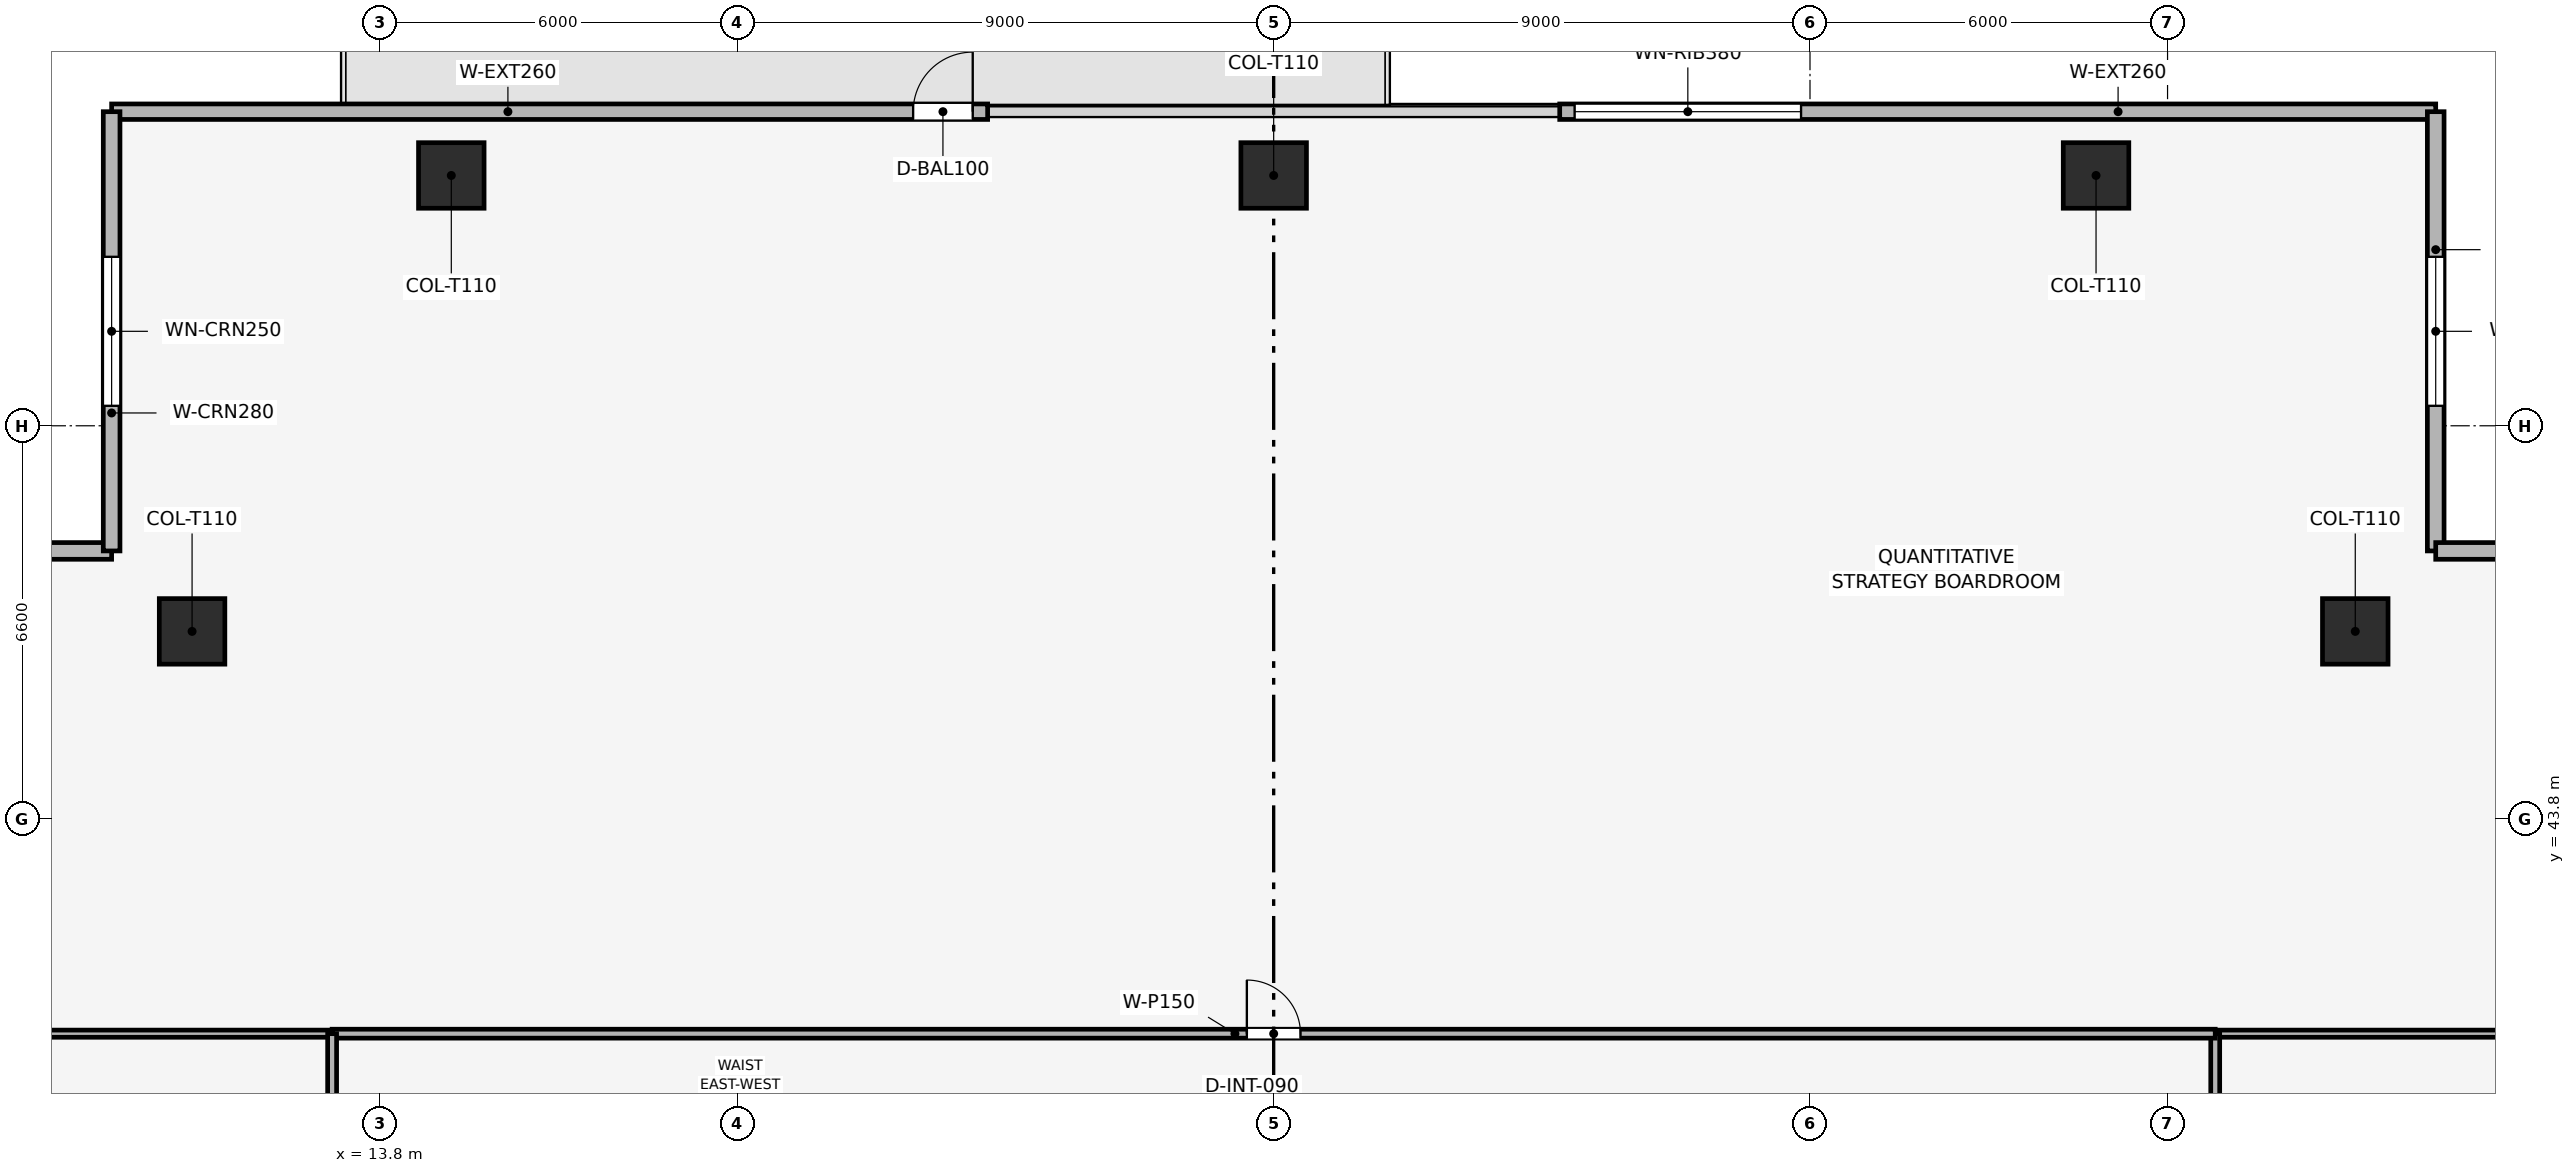
"""IFC4 building model, lengths in metres.
Left out: names, types, materials, properties, quantities, classifications, styles, units other than length and angle.
Written with IfcOpenShell. Run it as: python <this file> out.ifc"""

import sys

from ifc_helpers import new_model, si_unit, direction, frame, frame_2d, origin, origin_2d, place, context, subcontext, project, spatial, rectangle, extrude, element, fill, save


model = new_model("IFC4")
c1 = context("Model", 3, precision=1e-05, world=origin(), true_north=direction((0.0, 1.0)))
c2 = subcontext(c1, "Body", "Model", "MODEL_VIEW")
j1 = project(units=[si_unit("LENGTHUNIT", "METRE"), si_unit("PLANEANGLEUNIT", "RADIAN")], contexts=[c1])
p1 = place(None, origin())
s1 = spatial("IfcSite", under=j1, at=p1, CompositionType="ELEMENT")
p2 = place(p1, origin())
s2 = spatial("IfcBuilding", under=s1, at=p2, CompositionType="ELEMENT")
p3 = place(p2, frame((0.0, 0.0, 214.95)))
s3 = spatial("IfcBuildingStorey", under=s2, at=p3, CompositionType="ELEMENT", Elevation=214.95)
for number, where, z_axis, x_axis in (
    (1, (42.6, 54.6, 0.003), (0.0, 0.0, 1.0), (1.0, 0.0, 0.0)),
    (2, (28.8, 54.6, 0.003), (0.0, 0.0, 1.0), (1.0, 0.0, 0.0)),
    (3, (15.0, 54.6, 0.003), (0.0, 0.0, 1.0), (1.0, 0.0, 0.0)),
    (4, (46.95, 46.95, 0.003), (0.0, 0.0, 1.0), (1.0, 0.0, 0.0)),
    (5, (10.65, 46.95, 0.003), (0.0, 0.0, 1.0), (1.0, 0.0, 0.0)),
):
    element("IfcColumn", number, at=place(p3, frame(where, z_axis=z_axis, x_axis=x_axis)), inside=s3, PredefinedType="COLUMN", context=c2, shape_type="SweptSolid", body=[
        extrude(rectangle(XDim=1.1, YDim=1.1, at=origin_2d()), origin(), (0.0, 0.0, 1.0), 3.494),
    ])
p4 = place(p3, frame((9.3, 55.67, 0.0), z_axis=(0.0, 0.0, 1.0), x_axis=(1.0, 0.0, 0.0)))
e6 = element("IfcWall", 6, at=p4, inside=s3, PredefinedType="SOLIDWALL", context=c2, shape_type="SweptSolid", body=[
    extrude(rectangle(XDim=14.7, YDim=0.26, at=frame_2d((7.35, 0.0))), origin(), (0.0, 0.0, 1.0), 3.5),
])
p5 = place(p4, frame((13.45, 0.0, 0.0)))
e7 = element("IfcOpeningElement", 7, at=p5, cuts=e6, PredefinedType="OPENING", context=c2, shape_type="SweptSolid", body=[
    extrude(rectangle(XDim=1.0, YDim=2.2, at=frame_2d((0.5, 1.1))), frame((0.0, 0.14, 0.0), z_axis=(0.0, -1.0, 0.0), x_axis=(1.0, 0.0, 0.0)), (0.0, 0.0, 1.0), 0.28),
])
p6 = place(p3, frame((33.6, 55.67, 0.0), z_axis=(0.0, 0.0, 1.0), x_axis=(1.0, 0.0, 0.0)))
e8 = element("IfcWall", 8, at=p6, inside=s3, PredefinedType="SOLIDWALL", context=c2, shape_type="SweptSolid", body=[
    extrude(rectangle(XDim=14.7, YDim=0.26, at=frame_2d((7.35, 0.0))), origin(), (0.0, 0.0, 1.0), 3.5),
])
p7 = place(p6, frame((0.25, 0.0, 0.9)))
e9 = element("IfcOpeningElement", 9, at=p7, cuts=e8, PredefinedType="OPENING", context=c2, shape_type="SweptSolid", body=[
    extrude(rectangle(XDim=3.8, YDim=1.9, at=frame_2d((1.9, 0.95))), frame((0.0, 0.14, 0.0), z_axis=(0.0, -1.0, 0.0), x_axis=(1.0, 0.0, 0.0)), (0.0, 0.0, 1.0), 0.28),
])
p8 = place(p3, frame((1.93, 48.3, 0.0), z_axis=(0.0, 0.0, 1.0), x_axis=(1.0, 0.0, 0.0)))
e10 = element("IfcWall", 10, at=p8, inside=s3, PredefinedType="SOLIDWALL", context=c2, shape_type="SweptSolid", body=[
    extrude(rectangle(XDim=7.37, YDim=0.28, at=frame_2d((3.685, 0.0))), origin(), (0.0, 0.0, 1.0), 3.5),
])
p9 = place(p8, frame((2.435, 0.0, 0.9)))
e11 = element("IfcOpeningElement", 11, at=p9, cuts=e10, PredefinedType="OPENING", context=c2, shape_type="SweptSolid", body=[
    extrude(rectangle(XDim=2.5, YDim=1.9, at=frame_2d((1.25, 0.95))), frame((0.0, 0.15, 0.0), z_axis=(0.0, -1.0, 0.0), x_axis=(1.0, 0.0, 0.0)), (0.0, 0.0, 1.0), 0.3),
])
p10 = place(p3, frame((9.3, 48.3, 0.0), z_axis=(0.0, 0.0, 1.0), x_axis=(0.0, 1.0, 0.0)))
e12 = element("IfcWall", 12, at=p10, inside=s3, PredefinedType="SOLIDWALL", context=c2, shape_type="SweptSolid", body=[
    extrude(rectangle(XDim=7.37, YDim=0.28, at=frame_2d((3.685, 0.0))), origin(), (0.0, 0.0, 1.0), 3.5),
])
p11 = place(p10, frame((2.435, 0.0, 0.9)))
e13 = element("IfcOpeningElement", 13, at=p11, cuts=e12, PredefinedType="OPENING", context=c2, shape_type="SweptSolid", body=[
    extrude(rectangle(XDim=2.5, YDim=1.9, at=frame_2d((1.25, 0.95))), frame((0.0, 0.15, 0.0), z_axis=(0.0, -1.0, 0.0), x_axis=(1.0, 0.0, 0.0)), (0.0, 0.0, 1.0), 0.3),
])
p12 = place(p3, frame((48.3, 55.67, 0.0), z_axis=(0.0, 0.0, 1.0), x_axis=(0.0, -1.0, 0.0)))
e14 = element("IfcWall", 14, at=p12, inside=s3, PredefinedType="SOLIDWALL", context=c2, shape_type="SweptSolid", body=[
    extrude(rectangle(XDim=7.37, YDim=0.28, at=frame_2d((3.685, 0.0))), origin(), (0.0, 0.0, 1.0), 3.5),
])
p13 = place(p12, frame((2.435, 0.0, 0.9)))
e15 = element("IfcOpeningElement", 15, at=p13, cuts=e14, PredefinedType="OPENING", context=c2, shape_type="SweptSolid", body=[
    extrude(rectangle(XDim=2.5, YDim=1.9, at=frame_2d((1.25, 0.95))), frame((0.0, 0.15, 0.0), z_axis=(0.0, -1.0, 0.0), x_axis=(1.0, 0.0, 0.0)), (0.0, 0.0, 1.0), 0.3),
])
p14 = place(p3, frame((48.3, 48.3, 0.0), z_axis=(0.0, 0.0, 1.0), x_axis=(1.0, 0.0, 0.0)))
e16 = element("IfcWall", 16, at=p14, inside=s3, PredefinedType="SOLIDWALL", context=c2, shape_type="SweptSolid", body=[
    extrude(rectangle(XDim=7.37, YDim=0.28, at=frame_2d((3.685, 0.0))), origin(), (0.0, 0.0, 1.0), 3.5),
])
p15 = place(p14, frame((2.435, 0.0, 0.9)))
e17 = element("IfcOpeningElement", 17, at=p15, cuts=e16, PredefinedType="OPENING", context=c2, shape_type="SweptSolid", body=[
    extrude(rectangle(XDim=2.5, YDim=1.9, at=frame_2d((1.25, 0.95))), frame((0.0, 0.15, 0.0), z_axis=(0.0, -1.0, 0.0), x_axis=(1.0, 0.0, 0.0)), (0.0, 0.0, 1.0), 0.3),
])
p16 = place(p3, frame((1.93, 40.2, 0.0), z_axis=(0.0, 0.0, 1.0), x_axis=(1.0, 0.0, 0.0)))
e18 = element("IfcWall", 18, at=p16, inside=s3, PredefinedType="PARTITIONING", context=c2, shape_type="SweptSolid", body=[
    extrude(rectangle(XDim=11.07, YDim=0.12, at=frame_2d((5.535, 0.0))), origin(), (0.0, 0.0, 1.0), 2.885),
])
p17 = place(p3, frame((44.6, 40.2, 0.0), z_axis=(0.0, 0.0, 1.0), x_axis=(1.0, 0.0, 0.0)))
e19 = element("IfcWall", 19, at=p17, inside=s3, PredefinedType="PARTITIONING", context=c2, shape_type="SweptSolid", body=[
    extrude(rectangle(XDim=11.07, YDim=0.12, at=frame_2d((5.535, 0.0))), origin(), (0.0, 0.0, 1.0), 2.885),
])
p18 = place(p3, frame((44.6, 37.8, 0.0), z_axis=(0.0, 0.0, 1.0), x_axis=(0.0, 1.0, 0.0)))
e20 = element("IfcWall", 20, at=p18, inside=s3, PredefinedType="PARTITIONING", context=c2, shape_type="SweptSolid", body=[
    extrude(rectangle(XDim=2.4, YDim=0.15, at=frame_2d((1.2, 0.0))), origin(), (0.0, 0.0, 1.0), 3.5),
])
p19 = place(p3, frame((13.0, 40.2, 0.0), z_axis=(0.0, 0.0, 1.0), x_axis=(1.0, 0.0, 0.0)))
e21 = element("IfcWall", 21, at=p19, inside=s3, PredefinedType="PARTITIONING", context=c2, shape_type="SweptSolid", body=[
    extrude(rectangle(XDim=31.6, YDim=0.15, at=frame_2d((15.8, 0.0))), origin(), (0.0, 0.0, 1.0), 3.035),
])
p20 = place(p19, frame((15.35, 0.0, 0.0)))
e22 = element("IfcOpeningElement", 22, at=p20, cuts=e21, PredefinedType="OPENING", context=c2, shape_type="SweptSolid", body=[
    extrude(rectangle(XDim=0.9, YDim=2.1, at=frame_2d((0.45, 1.05))), frame((0.0, 0.085, 0.0), z_axis=(0.0, -1.0, 0.0), x_axis=(1.0, 0.0, 0.0)), (0.0, 0.0, 1.0), 0.17),
])
p21 = place(p3, frame((13.0, 17.4, 0.0), z_axis=(0.0, 0.0, 1.0), x_axis=(0.0, 1.0, 0.0)))
e23 = element("IfcWall", 23, at=p21, inside=s3, PredefinedType="PARTITIONING", context=c2, shape_type="SweptSolid", body=[
    extrude(rectangle(XDim=22.8, YDim=0.15, at=frame_2d((11.4, 0.0))), origin(), (0.0, 0.0, 1.0), 3.035),
])
p22 = place(p21, frame((3.1, 0.0, 0.0)))
e24 = element("IfcOpeningElement", 24, at=p22, cuts=e23, PredefinedType="OPENING", context=c2, shape_type="SweptSolid", body=[
    extrude(rectangle(XDim=0.9, YDim=2.1, at=frame_2d((0.45, 1.05))), frame((0.0, 0.085, 0.0), z_axis=(0.0, -1.0, 0.0), x_axis=(1.0, 0.0, 0.0)), (0.0, 0.0, 1.0), 0.17),
])
p23 = place(p21, frame((6.529, 0.0, 0.0)))
e25 = element("IfcOpeningElement", 25, at=p23, cuts=e23, PredefinedType="OPENING", context=c2, shape_type="SweptSolid", body=[
    extrude(rectangle(XDim=0.9, YDim=2.1, at=frame_2d((0.45, 1.05))), frame((0.0, 0.085, 0.0), z_axis=(0.0, -1.0, 0.0), x_axis=(1.0, 0.0, 0.0)), (0.0, 0.0, 1.0), 0.17),
])
p24 = place(p21, frame((10.957, 0.0, 0.0)))
e26 = element("IfcOpeningElement", 26, at=p24, cuts=e23, PredefinedType="OPENING", context=c2, shape_type="SweptSolid", body=[
    extrude(rectangle(XDim=0.9, YDim=2.1, at=frame_2d((0.45, 1.05))), frame((0.0, 0.085, 0.0), z_axis=(0.0, -1.0, 0.0), x_axis=(1.0, 0.0, 0.0)), (0.0, 0.0, 1.0), 0.17),
])
p25 = place(p21, frame((16.527, 0.0, 0.0)))
e27 = element("IfcOpeningElement", 27, at=p25, cuts=e23, PredefinedType="OPENING", context=c2, shape_type="SweptSolid", body=[
    extrude(rectangle(XDim=0.9, YDim=2.1, at=frame_2d((0.45, 1.05))), frame((0.0, 0.085, 0.0), z_axis=(0.0, -1.0, 0.0), x_axis=(1.0, 0.0, 0.0)), (0.0, 0.0, 1.0), 0.17),
])
p26 = place(p5, origin())
e28 = element("IfcDoor", 28, at=p26, inside=s3, OperationType="SINGLE_SWING_RIGHT", PredefinedType="DOOR", context=c2, shape_type="SweptSolid", body=[
    extrude(rectangle(XDim=1.0, YDim=2.2, at=frame_2d((0.5, 1.1))), frame((0.0, 0.025, 0.0), z_axis=(0.0, -1.0, 0.0), x_axis=(1.0, 0.0, 0.0)), (0.0, 0.0, 1.0), 0.05),
])
fill(e7, e28)
p27 = place(p7, origin())
e29 = element("IfcWindow", 29, at=p27, inside=s3, PartitioningType="SINGLE_PANEL", PredefinedType="WINDOW", context=c2, shape_type="SweptSolid", body=[
    extrude(rectangle(XDim=3.8, YDim=1.9, at=frame_2d((1.9, 0.95))), frame((0.0, 0.03, 0.0), z_axis=(0.0, -1.0, 0.0), x_axis=(1.0, 0.0, 0.0)), (0.0, 0.0, 1.0), 0.06),
])
fill(e9, e29)
p28 = place(p11, origin())
e30 = element("IfcWindow", 30, at=p28, inside=s3, PartitioningType="SINGLE_PANEL", PredefinedType="WINDOW", context=c2, shape_type="SweptSolid", body=[
    extrude(rectangle(XDim=2.5, YDim=1.9, at=frame_2d((1.25, 0.95))), frame((0.0, 0.03, 0.0), z_axis=(0.0, -1.0, 0.0), x_axis=(1.0, 0.0, 0.0)), (0.0, 0.0, 1.0), 0.06),
])
fill(e13, e30)
p29 = place(p13, origin())
e31 = element("IfcWindow", 31, at=p29, inside=s3, PartitioningType="SINGLE_PANEL", PredefinedType="WINDOW", context=c2, shape_type="SweptSolid", body=[
    extrude(rectangle(XDim=2.5, YDim=1.9, at=frame_2d((1.25, 0.95))), frame((0.0, 0.03, 0.0), z_axis=(0.0, -1.0, 0.0), x_axis=(1.0, 0.0, 0.0)), (0.0, 0.0, 1.0), 0.06),
])
fill(e15, e31)
p30 = place(p20, origin())
e32 = element("IfcDoor", 32, at=p30, inside=s3, OperationType="SINGLE_SWING_LEFT", PredefinedType="DOOR", context=c2, shape_type="SweptSolid", body=[
    extrude(rectangle(XDim=0.9, YDim=2.1, at=frame_2d((0.45, 1.05))), frame((0.0, 0.025, 0.0), z_axis=(0.0, -1.0, 0.0), x_axis=(1.0, 0.0, 0.0)), (0.0, 0.0, 1.0), 0.05),
])
fill(e22, e32)
save(model, sys.argv[1])
